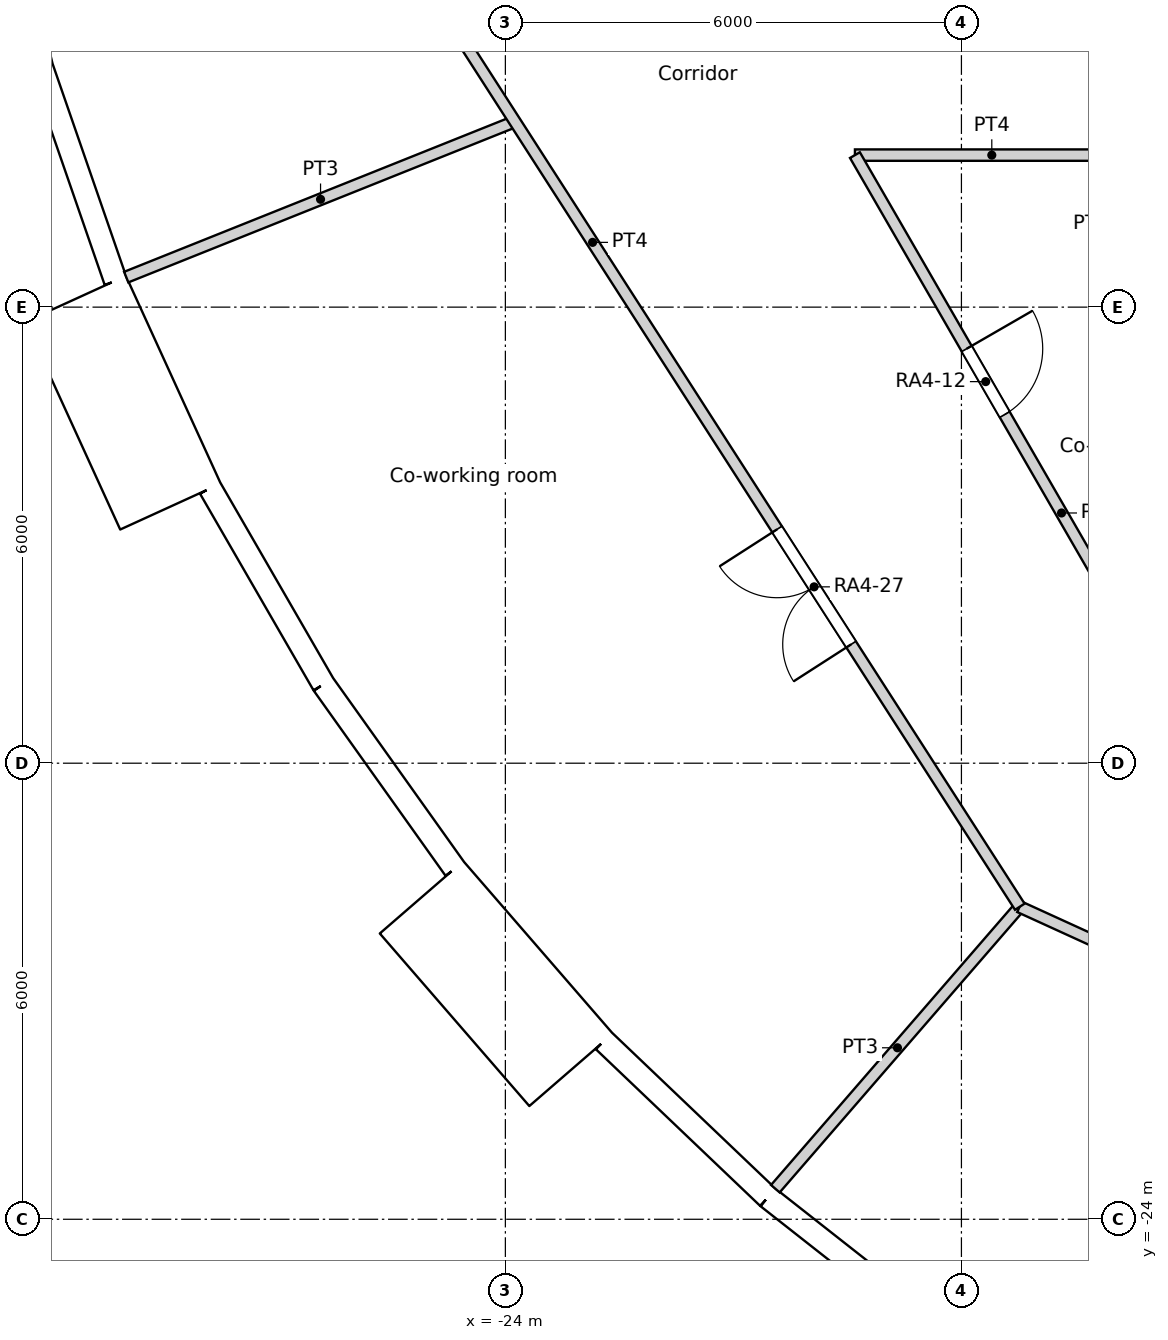
"""IFC4 building model, lengths in metres.
Left out: names, types, materials, properties, quantities, classifications, styles, units other than length and angle.
Written with IfcOpenShell. Run it as: python <this file> out.ifc"""

import sys

from ifc_helpers import new_model, si_unit, direction, frame, frame_2d, origin, origin_2d, place, context, subcontext, project, spatial, rectangle, circle, extrude, element, fill, save


model = new_model("IFC4")
c1 = context("Model", 3, precision=1e-05, world=origin(), true_north=direction((0.0, 1.0)))
c2 = subcontext(c1, "Body", "Model", "MODEL_VIEW")
j1 = project(units=[si_unit("LENGTHUNIT", "METRE"), si_unit("PLANEANGLEUNIT", "RADIAN")], contexts=[c1])
p1 = place(None, origin())
s1 = spatial("IfcSite", under=j1, at=p1, CompositionType="ELEMENT")
p2 = place(p1, origin())
s2 = spatial("IfcBuilding", under=s1, at=p2, CompositionType="ELEMENT")
p3 = place(p2, frame((0.0, 0.0, 60.6)))
s3 = spatial("IfcBuildingStorey", under=s2, at=p3, CompositionType="ELEMENT", Elevation=60.6)
for number, where, z_axis, x_axis in (
    (1, (-29.048, -8.529, 0.0), (0.0, 0.0, 1.0), (1.0, 0.0, 0.0)),
    (2, (-26.909, -13.873, 0.0), (0.0, 0.0, 1.0), (1.0, 0.0, 0.0)),
    (3, (-23.797, -18.715, 0.0), (0.0, 0.0, 1.0), (1.0, 0.0, 0.0)),
    (4, (-19.826, -22.88, 0.0), (0.0, 0.0, 1.0), (1.0, 0.0, 0.0)),
):
    element("IfcColumn", number, at=place(p3, frame(where, z_axis=z_axis, x_axis=x_axis)), inside=s3, PredefinedType="COLUMN", context=c2, shape_type="SweptSolid", body=[
        extrude(circle(Radius=0.7, at=origin_2d()), origin(), (0.0, 0.0, 1.0), 3.6),
    ])
for number, where, z_axis, x_axis in (
    (5, (-23.067, -8.396, 0.0), (0.0, 0.0, 1.0), (1.0, 0.0, 0.0)),
    (6, (-20.509, -13.489, 0.0), (0.0, 0.0, 1.0), (1.0, 0.0, 0.0)),
    (7, (-16.846, -17.855, 0.0), (0.0, 0.0, 1.0), (1.0, 0.0, 0.0)),
):
    element("IfcColumn", number, at=place(p3, frame(where, z_axis=z_axis, x_axis=x_axis)), inside=s3, PredefinedType="COLUMN", context=c2, shape_type="SweptSolid", body=[
        extrude(circle(Radius=0.75, at=origin_2d()), origin(), (0.0, 0.0, 1.0), 3.6),
    ])
p4 = place(p3, frame((-16.958, -8.167, 0.0), z_axis=(0.0, 0.0, 1.0), x_axis=(1.0, 0.0, 0.0)))
e8 = element("IfcColumn", 8, at=p4, inside=s3, PredefinedType="COLUMN", context=c2, shape_type="SweptSolid", body=[
    extrude(circle(Radius=0.8, at=origin_2d()), origin(), (0.0, 0.0, 1.0), 3.6),
])
p5 = place(p3, frame((-30.104, -8.839, 0.0), z_axis=(0.0, 0.0, 1.0), x_axis=(0.327071167136, -0.944999709856, 0.0)))
e9 = element("IfcWall", 9, at=p5, inside=s3, PredefinedType="SOLIDWALL", context=c2, shape_type="SweptSolid", body=[
    extrude(rectangle(XDim=2.98, YDim=0.3, at=frame_2d((1.49, 0.0))), origin(), (0.0, 0.0, 1.0), 3.15),
])
p6 = place(p5, frame((1.49, 0.0, 1.55)))
e10 = element("IfcOpeningElement", 10, at=p6, cuts=e9, PredefinedType="OPENING", context=c2, shape_type="SweptSolid", body=[
    extrude(circle(Radius=0.9, at=origin_2d()), frame((0.0, 0.16, 0.0), z_axis=(0.0, -1.0, 0.0), x_axis=(1.0, 0.0, 0.0)), (0.0, 0.0, 1.0), 0.32),
])
p7 = place(p3, frame((-29.653, -11.893, -0.45), z_axis=(0.0, 0.0, 1.0), x_axis=(0.415427028395, -0.909626508012, 0.0)))
e11 = element("IfcWall", 11, at=p7, inside=s3, PredefinedType="ELEMENTEDWALL", context=c2, shape_type="SweptSolid", body=[
    extrude(rectangle(XDim=3.0, YDim=1.45, at=frame_2d((1.5, 0.0))), origin(), (0.0, 0.0, 1.0), 3.6),
])
p8 = place(p7, frame((1.5, 0.0, 2.0)))
e12 = element("IfcOpeningElement", 12, at=p8, cuts=e11, PredefinedType="OPENING", context=c2, shape_type="SweptSolid", body=[
    extrude(circle(Radius=0.9, at=origin_2d()), frame((0.0, 0.735, 0.0), z_axis=(0.0, -1.0, 0.0), x_axis=(1.0, 0.0, 0.0)), (0.0, 0.0, 1.0), 1.47),
])
p9 = place(p3, frame((-27.884, -14.382, 0.0), z_axis=(0.0, 0.0, 1.0), x_axis=(0.500025049464, -0.866010940986, 0.0)))
e13 = element("IfcWall", 13, at=p9, inside=s3, PredefinedType="SOLIDWALL", context=c2, shape_type="SweptSolid", body=[
    extrude(rectangle(XDim=2.98, YDim=0.3, at=frame_2d((1.49, 0.0))), origin(), (0.0, 0.0, 1.0), 2.65),
])
p10 = place(p9, frame((1.49, 0.0, 1.55)))
e14 = element("IfcOpeningElement", 14, at=p10, cuts=e13, PredefinedType="OPENING", context=c2, shape_type="SweptSolid", body=[
    extrude(circle(Radius=0.9, at=origin_2d()), frame((0.0, 0.16, 0.0), z_axis=(0.0, -1.0, 0.0), x_axis=(1.0, 0.0, 0.0)), (0.0, 0.0, 1.0), 0.32),
])
p11 = place(p3, frame((-26.394, -16.962, 0.0), z_axis=(0.0, 0.0, 1.0), x_axis=(0.580059407678, -0.81457417315, 0.0)))
e15 = element("IfcWall", 15, at=p11, inside=s3, PredefinedType="SOLIDWALL", context=c2, shape_type="SweptSolid", body=[
    extrude(rectangle(XDim=2.979, YDim=0.3, at=frame_2d((1.49, 0.0))), origin(), (0.0, 0.0, 1.0), 3.15),
])
p12 = place(p11, frame((1.49, 0.0, 1.55)))
e16 = element("IfcOpeningElement", 16, at=p12, cuts=e15, PredefinedType="OPENING", context=c2, shape_type="SweptSolid", body=[
    extrude(circle(Radius=0.9, at=origin_2d()), frame((0.0, 0.16, 0.0), z_axis=(0.0, -1.0, 0.0), x_axis=(1.0, 0.0, 0.0)), (0.0, 0.0, 1.0), 0.32),
])
p13 = place(p3, frame((-25.101, -19.766, -0.45), z_axis=(0.0, 0.0, 1.0), x_axis=(0.654890259022, -0.75572398972, 0.0)))
e17 = element("IfcWall", 17, at=p13, inside=s3, PredefinedType="ELEMENTEDWALL", context=c2, shape_type="SweptSolid", body=[
    extrude(rectangle(XDim=3.0, YDim=1.45, at=frame_2d((1.5, 0.0))), origin(), (0.0, 0.0, 1.0), 3.6),
])
p14 = place(p13, frame((1.5, 0.0, 2.0)))
e18 = element("IfcOpeningElement", 18, at=p14, cuts=e17, PredefinedType="OPENING", context=c2, shape_type="SweptSolid", body=[
    extrude(circle(Radius=0.9, at=origin_2d()), frame((0.0, 0.735, 0.0), z_axis=(0.0, -1.0, 0.0), x_axis=(1.0, 0.0, 0.0)), (0.0, 0.0, 1.0), 1.47),
])
p15 = place(p3, frame((-22.702, -21.655, 0.0), z_axis=(0.0, 0.0, 1.0), x_axis=(0.723744206617, -0.690068346896, 0.0)))
e19 = element("IfcWall", 19, at=p15, inside=s3, PredefinedType="SOLIDWALL", context=c2, shape_type="SweptSolid", body=[
    extrude(rectangle(XDim=2.98, YDim=0.3, at=frame_2d((1.49, 0.0))), origin(), (0.0, 0.0, 1.0), 2.65),
])
p16 = place(p15, frame((1.49, 0.0, 1.55)))
e20 = element("IfcOpeningElement", 20, at=p16, cuts=e19, PredefinedType="OPENING", context=c2, shape_type="SweptSolid", body=[
    extrude(circle(Radius=0.9, at=origin_2d()), frame((0.0, 0.16, 0.0), z_axis=(0.0, -1.0, 0.0), x_axis=(1.0, 0.0, 0.0)), (0.0, 0.0, 1.0), 0.32),
])
p17 = place(p3, frame((-20.546, -23.711, 0.0), z_axis=(0.0, 0.0, 1.0), x_axis=(0.786045331304, -0.618168858108, 0.0)))
e21 = element("IfcWall", 21, at=p17, inside=s3, PredefinedType="SOLIDWALL", context=c2, shape_type="SweptSolid", body=[
    extrude(rectangle(XDim=2.98, YDim=0.3, at=frame_2d((1.49, 0.0))), origin(), (0.0, 0.0, 1.0), 3.15),
])
p18 = place(p17, frame((1.49, 0.0, 1.55)))
e22 = element("IfcOpeningElement", 22, at=p18, cuts=e21, PredefinedType="OPENING", context=c2, shape_type="SweptSolid", body=[
    extrude(circle(Radius=0.9, at=origin_2d()), frame((0.0, 0.16, 0.0), z_axis=(0.0, -1.0, 0.0), x_axis=(1.0, 0.0, 0.0)), (0.0, 0.0, 1.0), 0.32),
])
p19 = place(p3, frame((-19.401, -10.0, 0.0), z_axis=(0.0, 0.0, 1.0), x_axis=(1.0, 0.0, 0.0)))
e23 = element("IfcWall", 23, at=p19, inside=s3, PredefinedType="PARTITIONING", context=c2, shape_type="SweptSolid", body=[
    extrude(rectangle(XDim=3.601, YDim=0.15, at=frame_2d((1.8, 0.0))), origin(), (0.0, 0.0, 1.0), 3.15),
])
p20 = place(p3, frame((-19.401, -10.0, 0.0), z_axis=(0.0, 0.0, 1.0), x_axis=(0.499992689227, -0.86602962462, 0.0)))
e24 = element("IfcWall", 24, at=p20, inside=s3, PredefinedType="PARTITIONING", context=c2, shape_type="SweptSolid", body=[
    extrude(rectangle(XDim=6.882, YDim=0.15, at=frame_2d((3.441, 0.0))), origin(), (0.0, 0.0, 1.0), 3.15),
])
p21 = place(p20, frame((2.941, 0.0, 0.0)))
e25 = element("IfcOpeningElement", 25, at=p21, cuts=e24, PredefinedType="OPENING", context=c2, shape_type="SweptSolid", body=[
    extrude(rectangle(XDim=1.0, YDim=2.04, at=frame_2d((0.5, 1.02))), frame((0.0, 0.075, 0.0), z_axis=(0.0, -1.0, 0.0), x_axis=(1.0, 0.0, 0.0)), (0.0, 0.0, 1.0), 0.15),
])
p22 = place(p3, frame((-25.253, -7.415, 0.0), z_axis=(0.0, 0.0, 1.0), x_axis=(0.540867421004, -0.841107860442, 0.0)))
e26 = element("IfcWall", 26, at=p22, inside=s3, PredefinedType="PARTITIONING", context=c2, shape_type="SweptSolid", body=[
    extrude(rectangle(XDim=14.829, YDim=0.15, at=frame_2d((7.415, 0.0))), origin(), (0.0, 0.0, 1.0), 3.15),
])
p23 = place(p22, frame((8.926, 0.0, 0.0)))
e27 = element("IfcOpeningElement", 27, at=p23, cuts=e26, PredefinedType="OPENING", context=c2, shape_type="SweptSolid", body=[
    extrude(rectangle(XDim=1.8, YDim=2.1, at=frame_2d((0.9, 1.05))), frame((0.0, 0.075, 0.0), z_axis=(0.0, -1.0, 0.0), x_axis=(1.0, 0.0, 0.0)), (0.0, 0.0, 1.0), 0.15),
])
p24 = place(p3, frame((-17.235, -19.89, 0.0), z_axis=(0.0, 0.0, 1.0), x_axis=(0.90960889055, -0.415465601743, 0.0)))
e28 = element("IfcWall", 28, at=p24, inside=s3, PredefinedType="PARTITIONING", context=c2, shape_type="SweptSolid", body=[
    extrude(rectangle(XDim=14.829, YDim=0.15, at=frame_2d((7.415, 0.0))), origin(), (0.0, 0.0, 1.0), 3.15),
])
p25 = place(p24, frame((6.514, 0.0, 0.0)))
e29 = element("IfcOpeningElement", 29, at=p25, cuts=e28, PredefinedType="OPENING", context=c2, shape_type="SweptSolid", body=[
    extrude(rectangle(XDim=1.8, YDim=2.1, at=frame_2d((0.9, 1.05))), frame((0.0, 0.075, 0.0), z_axis=(0.0, -1.0, 0.0), x_axis=(1.0, 0.0, 0.0)), (0.0, 0.0, 1.0), 0.15),
])
p26 = place(p3, frame((-28.988, -11.605, 0.0), z_axis=(0.0, 0.0, 1.0), x_axis=(0.928372711727, 0.371650518795, 0.0)))
e30 = element("IfcWall", 30, at=p26, inside=s3, PredefinedType="PARTITIONING", context=c2, shape_type="SweptSolid", body=[
    extrude(rectangle(XDim=5.508, YDim=0.15, at=frame_2d((2.754, 0.0))), origin(), (0.0, 0.0, 1.0), 3.15),
])
p27 = place(p3, frame((-20.448, -23.598, 0.0), z_axis=(0.0, 0.0, 1.0), x_axis=(0.654847179409, 0.755761319214, 0.0)))
e31 = element("IfcWall", 31, at=p27, inside=s3, PredefinedType="PARTITIONING", context=c2, shape_type="SweptSolid", body=[
    extrude(rectangle(XDim=4.906, YDim=0.15, at=frame_2d((2.453, 0.0))), origin(), (0.0, 0.0, 1.0), 3.15),
])
p28 = place(p6, origin())
e32 = element("IfcWindow", 32, at=p28, inside=s3, PartitioningType="SINGLE_PANEL", PredefinedType="WINDOW", context=c2, shape_type="SweptSolid", body=[
    extrude(circle(Radius=0.9, at=origin_2d()), frame((0.0, 0.12, 0.0), z_axis=(0.0, -1.0, 0.0), x_axis=(1.0, 0.0, 0.0)), (0.0, 0.0, 1.0), 0.1),
])
fill(e10, e32)
p29 = place(p8, origin())
e33 = element("IfcWindow", 33, at=p29, inside=s3, PartitioningType="SINGLE_PANEL", PredefinedType="WINDOW", context=c2, shape_type="SweptSolid", body=[
    extrude(circle(Radius=0.9, at=origin_2d()), frame((0.0, 0.695, 0.0), z_axis=(0.0, -1.0, 0.0), x_axis=(1.0, 0.0, 0.0)), (0.0, 0.0, 1.0), 0.1),
])
fill(e12, e33)
p30 = place(p10, origin())
e34 = element("IfcWindow", 34, at=p30, inside=s3, PartitioningType="SINGLE_PANEL", PredefinedType="WINDOW", context=c2, shape_type="SweptSolid", body=[
    extrude(circle(Radius=0.9, at=origin_2d()), frame((0.0, 0.12, 0.0), z_axis=(0.0, -1.0, 0.0), x_axis=(1.0, 0.0, 0.0)), (0.0, 0.0, 1.0), 0.1),
])
fill(e14, e34)
p31 = place(p12, origin())
e35 = element("IfcWindow", 35, at=p31, inside=s3, PartitioningType="SINGLE_PANEL", PredefinedType="WINDOW", context=c2, shape_type="SweptSolid", body=[
    extrude(circle(Radius=0.9, at=origin_2d()), frame((0.0, 0.12, 0.0), z_axis=(0.0, -1.0, 0.0), x_axis=(1.0, 0.0, 0.0)), (0.0, 0.0, 1.0), 0.1),
])
fill(e16, e35)
p32 = place(p14, origin())
e36 = element("IfcWindow", 36, at=p32, inside=s3, PartitioningType="SINGLE_PANEL", PredefinedType="WINDOW", context=c2, shape_type="SweptSolid", body=[
    extrude(circle(Radius=0.9, at=origin_2d()), frame((0.0, 0.695, 0.0), z_axis=(0.0, -1.0, 0.0), x_axis=(1.0, 0.0, 0.0)), (0.0, 0.0, 1.0), 0.1),
])
fill(e18, e36)
p33 = place(p16, origin())
e37 = element("IfcWindow", 37, at=p33, inside=s3, PartitioningType="SINGLE_PANEL", PredefinedType="WINDOW", context=c2, shape_type="SweptSolid", body=[
    extrude(circle(Radius=0.9, at=origin_2d()), frame((0.0, 0.12, 0.0), z_axis=(0.0, -1.0, 0.0), x_axis=(1.0, 0.0, 0.0)), (0.0, 0.0, 1.0), 0.1),
])
fill(e20, e37)
p34 = place(p18, origin())
e38 = element("IfcWindow", 38, at=p34, inside=s3, PartitioningType="SINGLE_PANEL", PredefinedType="WINDOW", context=c2, shape_type="SweptSolid", body=[
    extrude(circle(Radius=0.9, at=origin_2d()), frame((0.0, 0.12, 0.0), z_axis=(0.0, -1.0, 0.0), x_axis=(1.0, 0.0, 0.0)), (0.0, 0.0, 1.0), 0.1),
])
fill(e22, e38)
p35 = place(p21, origin())
e39 = element("IfcDoor", 39, at=p35, inside=s3, OperationType="SINGLE_SWING_LEFT", PredefinedType="DOOR", context=c2, shape_type="SweptSolid", body=[
    extrude(rectangle(XDim=1.0, YDim=2.04, at=frame_2d((0.5, 1.02))), frame((0.0, 0.025, 0.0), z_axis=(0.0, -1.0, 0.0), x_axis=(1.0, 0.0, 0.0)), (0.0, 0.0, 1.0), 0.05),
])
fill(e25, e39)
p36 = place(p23, origin())
e40 = element("IfcDoor", 40, at=p36, inside=s3, OperationType="DOUBLE_DOOR_SINGLE_SWING", PredefinedType="DOOR", context=c2, shape_type="SweptSolid", body=[
    extrude(rectangle(XDim=1.8, YDim=2.1, at=frame_2d((0.9, 1.05))), frame((0.0, 0.025, 0.0), z_axis=(0.0, -1.0, 0.0), x_axis=(1.0, 0.0, 0.0)), (0.0, 0.0, 1.0), 0.05),
])
fill(e27, e40)
save(model, sys.argv[1])
